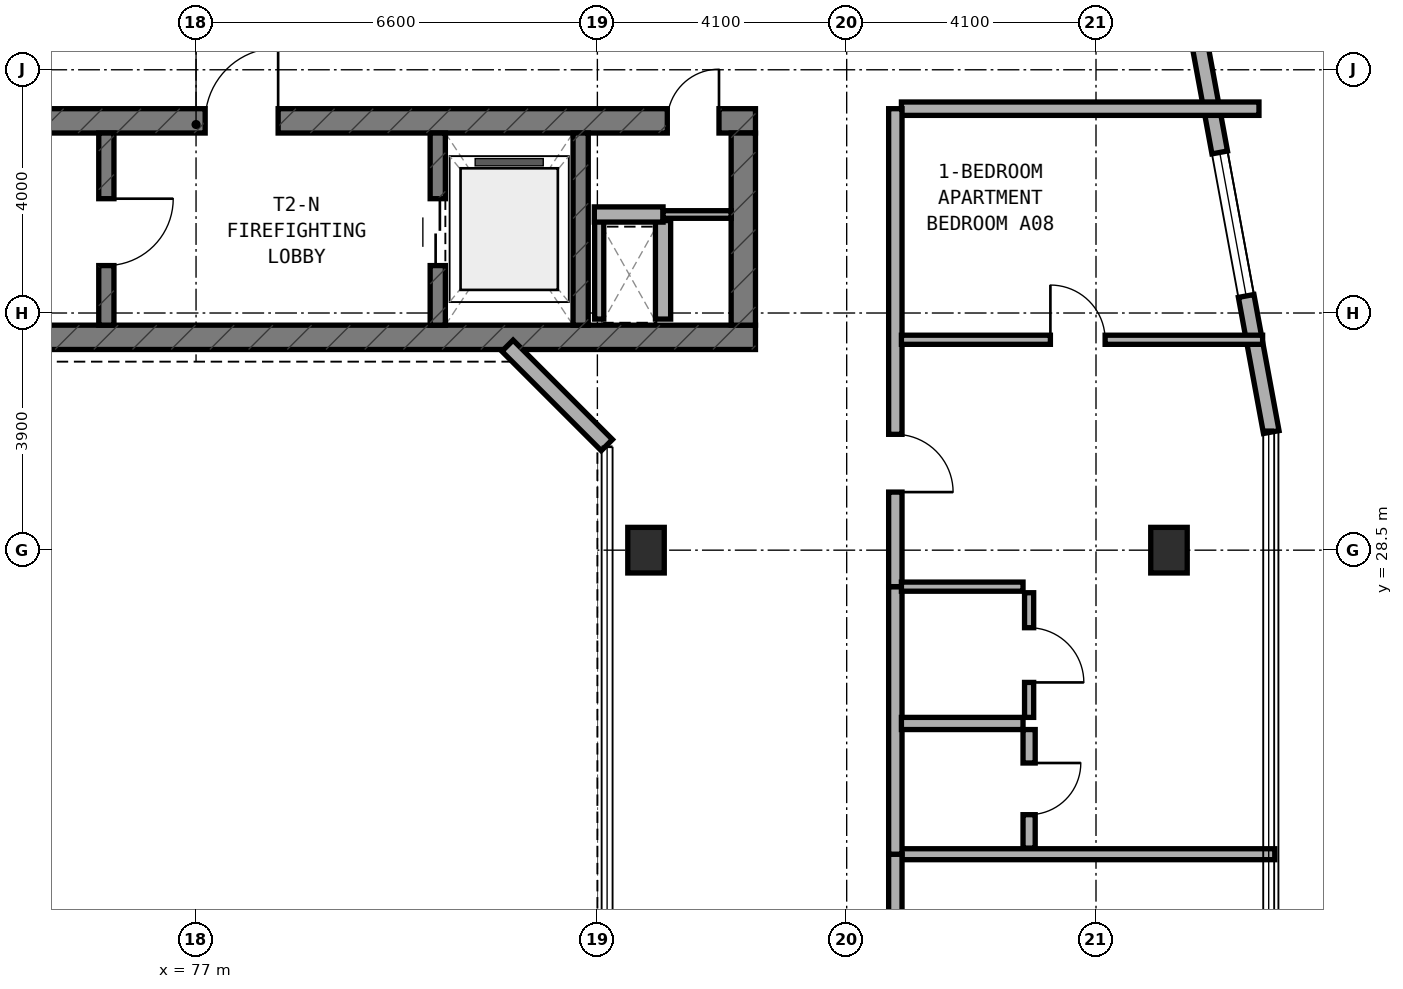
"""IFC4 building model, lengths in metres.
Left out: names, types, materials, properties, quantities, classifications, styles, units other than length and angle.
Written with IfcOpenShell. Run it as: python <this file> out.ifc"""

import sys

from ifc_helpers import new_model, si_unit, direction, frame, frame_2d, origin, origin_2d, place, context, subcontext, project, spatial, rectangle, extrude, element, fill, save


model = new_model("IFC4")
c1 = context("Model", 3, precision=1e-05, world=origin(), true_north=direction((0.0, 1.0)))
c2 = subcontext(c1, "Body", "Model", "MODEL_VIEW")
j1 = project(units=[si_unit("LENGTHUNIT", "METRE"), si_unit("PLANEANGLEUNIT", "RADIAN")], contexts=[c1])
p1 = place(None, origin())
s1 = spatial("IfcSite", under=j1, at=p1, CompositionType="ELEMENT")
p2 = place(p1, origin())
s2 = spatial("IfcBuilding", under=s1, at=p2, CompositionType="ELEMENT")
p3 = place(p2, frame((0.0, 0.0, 95.0)))
s3 = spatial("IfcBuildingStorey", under=s2, at=p3, CompositionType="ELEMENT", Elevation=95.0)
p4 = place(p3, frame((68.0, 32.0, 0.0), z_axis=(0.0, 0.0, 1.0), x_axis=(1.0, 0.0, 0.0)))
e1 = element("IfcWall", 1, at=p4, inside=s3, PredefinedType="SHEAR", context=c2, shape_type="SweptSolid", body=[
    extrude(rectangle(XDim=18.2, YDim=0.4, at=frame_2d((9.1, 0.0))), origin(), (0.0, 0.0, 1.0), 3.5),
])
p5 = place(p3, frame((68.0, 35.56, 0.0), z_axis=(0.0, 0.0, 1.0), x_axis=(1.0, 0.0, 0.0)))
e2 = element("IfcWall", 2, at=p5, inside=s3, PredefinedType="SHEAR", context=c2, shape_type="SweptSolid", body=[
    extrude(rectangle(XDim=18.2, YDim=0.4, at=frame_2d((9.1, 0.0))), origin(), (0.0, 0.0, 1.0), 3.5),
])
p6 = place(p5, frame((9.15, 0.0, 0.0)))
e3 = element("IfcOpeningElement", 3, at=p6, cuts=e2, PredefinedType="OPENING", context=c2, shape_type="SweptSolid", body=[
    extrude(rectangle(XDim=1.2, YDim=2.15, at=frame_2d((0.6, 1.075))), frame((0.0, 0.21, 0.0), z_axis=(0.0, -1.0, 0.0), x_axis=(1.0, 0.0, 0.0)), (0.0, 0.0, 1.0), 0.42),
])
p7 = place(p5, frame((16.75, 0.0, 0.0)))
e4 = element("IfcOpeningElement", 4, at=p7, cuts=e2, PredefinedType="OPENING", context=c2, shape_type="SweptSolid", body=[
    extrude(rectangle(XDim=0.85, YDim=2.1, at=frame_2d((0.425, 1.05))), frame((0.0, 0.21, 0.0), z_axis=(0.0, -1.0, 0.0), x_axis=(1.0, 0.0, 0.0)), (0.0, 0.0, 1.0), 0.42),
])
p8 = place(p3, frame((86.0, 32.2, 0.0), z_axis=(0.0, 0.0, 1.0), x_axis=(0.0, 1.0, 0.0)))
e5 = element("IfcWall", 5, at=p8, inside=s3, PredefinedType="SHEAR", context=c2, shape_type="SweptSolid", body=[
    extrude(rectangle(XDim=3.16, YDim=0.4, at=frame_2d((1.58, 0.0))), origin(), (0.0, 0.0, 1.0), 3.5),
])
p9 = place(p3, frame((75.525, 32.2, 0.0), z_axis=(0.0, 0.0, 1.0), x_axis=(0.0, 1.0, 0.0)))
e6 = element("IfcWall", 6, at=p9, inside=s3, PredefinedType="STANDARD", context=c2, shape_type="SweptSolid", body=[
    extrude(rectangle(XDim=3.16, YDim=0.25, at=frame_2d((1.58, 0.0))), origin(), (0.0, 0.0, 1.0), 3.25),
])
p10 = place(p9, frame((0.98, 0.0, 0.0)))
e7 = element("IfcOpeningElement", 7, at=p10, cuts=e6, PredefinedType="OPENING", context=c2, shape_type="SweptSolid", body=[
    extrude(rectangle(XDim=1.1, YDim=2.15, at=frame_2d((0.55, 1.075))), frame((0.0, 0.135, 0.0), z_axis=(0.0, -1.0, 0.0), x_axis=(1.0, 0.0, 0.0)), (0.0, 0.0, 1.0), 0.27),
])
p11 = place(p3, frame((80.975, 32.2, 0.0), z_axis=(0.0, 0.0, 1.0), x_axis=(0.0, 1.0, 0.0)))
e8 = element("IfcWall", 8, at=p11, inside=s3, PredefinedType="STANDARD", context=c2, shape_type="SweptSolid", body=[
    extrude(rectangle(XDim=3.16, YDim=0.25, at=frame_2d((1.58, 0.0))), origin(), (0.0, 0.0, 1.0), 3.25),
])
p12 = place(p11, frame((0.98, 0.0, 0.0)))
e9 = element("IfcOpeningElement", 9, at=p12, cuts=e8, PredefinedType="OPENING", context=c2, shape_type="SweptSolid", body=[
    extrude(rectangle(XDim=1.1, YDim=2.15, at=frame_2d((0.55, 1.075))), frame((0.0, 0.135, 0.0), z_axis=(0.0, -1.0, 0.0), x_axis=(1.0, 0.0, 0.0)), (0.0, 0.0, 1.0), 0.27),
])
p13 = place(p3, frame((83.325, 32.2, 0.0), z_axis=(0.0, 0.0, 1.0), x_axis=(0.0, 1.0, 0.0)))
e10 = element("IfcWall", 10, at=p13, inside=s3, PredefinedType="STANDARD", context=c2, shape_type="SweptSolid", body=[
    extrude(rectangle(XDim=3.16, YDim=0.25, at=frame_2d((1.58, 0.0))), origin(), (0.0, 0.0, 1.0), 3.25),
])
for number, where, z_axis, x_axis in (
    (11, (93.0, 28.5, 0.0), (0.0, 0.0, 1.0), (1.0, 0.0, 0.0)),
    (12, (84.4, 28.5, 0.0), (0.0, 0.0, 1.0), (1.0, 0.0, 0.0)),
):
    element("IfcColumn", number, at=place(p3, frame(where, z_axis=z_axis, x_axis=x_axis)), inside=s3, PredefinedType="COLUMN", context=c2, shape_type="SweptSolid", body=[
        extrude(rectangle(XDim=0.6, YDim=0.75, at=origin_2d()), origin(), (0.0, 0.0, 1.0), 3.5),
    ])
p14 = place(p3, frame((94.682, 30.442, 0.0), z_axis=(0.0, 0.0, 1.0), x_axis=(-0.181209963057, 0.983444431215, 0.0)))
e13 = element("IfcWall", 13, at=p14, inside=s3, PredefinedType="STANDARD", context=c2, shape_type="SweptSolid", body=[
    extrude(rectangle(XDim=8.889, YDim=0.26, at=frame_2d((4.445, 0.0))), origin(), (0.0, 0.0, 1.0), 3.25),
])
p15 = place(p14, frame((2.276, 0.0, 0.8)))
e14 = element("IfcOpeningElement", 14, at=p15, cuts=e13, PredefinedType="OPENING", context=c2, shape_type="SweptSolid", body=[
    extrude(rectangle(XDim=2.4, YDim=1.6, at=frame_2d((1.2, 0.8))), frame((0.0, 0.14, 0.0), z_axis=(0.0, -1.0, 0.0), x_axis=(1.0, 0.0, 0.0)), (0.0, 0.0, 1.0), 0.28),
])
p16 = place(p3, frame((83.756, 30.228, 0.0), z_axis=(0.0, 0.0, 1.0), x_axis=(-0.707106781187, 0.707106781187, 0.0)))
e15 = element("IfcWall", 15, at=p16, inside=s3, PredefinedType="STANDARD", context=c2, shape_type="SweptSolid", body=[
    extrude(rectangle(XDim=2.311, YDim=0.26, at=frame_2d((1.155, 0.0))), origin(), (0.0, 0.0, 1.0), 3.25),
])
p17 = place(p3, frame((83.63, 32.3, 0.0), z_axis=(0.0, 0.0, 1.0), x_axis=(0.0, 1.0, 0.0)))
e16 = element("IfcWall", 16, at=p17, inside=s3, PredefinedType="PARTITIONING", context=c2, shape_type="SweptSolid", body=[
    extrude(rectangle(XDim=1.62, YDim=0.15, at=frame_2d((0.81, 0.0))), origin(), (0.0, 0.0, 1.0), 2.825),
])
p18 = place(p3, frame((84.68, 32.3, 0.0), z_axis=(0.0, 0.0, 1.0), x_axis=(0.0, 1.0, 0.0)))
e17 = element("IfcWall", 17, at=p18, inside=s3, PredefinedType="SOLIDWALL", context=c2, shape_type="SweptSolid", body=[
    extrude(rectangle(XDim=1.62, YDim=0.25, at=frame_2d((0.81, 0.0))), origin(), (0.0, 0.0, 1.0), 3.22),
])
p19 = place(p3, frame((83.55, 34.02, 0.0), z_axis=(0.0, 0.0, 1.0), x_axis=(1.0, 0.0, 0.0)))
e18 = element("IfcWall", 18, at=p19, inside=s3, PredefinedType="SOLIDWALL", context=c2, shape_type="SweptSolid", body=[
    extrude(rectangle(XDim=1.13, YDim=0.25, at=frame_2d((0.565, 0.0))), origin(), (0.0, 0.0, 1.0), 3.22),
])
p20 = place(p3, frame((84.68, 34.02, 0.0), z_axis=(0.0, 0.0, 1.0), x_axis=(1.0, 0.0, 0.0)))
e19 = element("IfcWall", 19, at=p20, inside=s3, PredefinedType="PARTITIONING", context=c2, shape_type="SweptSolid", body=[
    extrude(rectangle(XDim=1.12, YDim=0.125, at=frame_2d((0.56, 0.0))), origin(), (0.0, 0.0, 1.0), 3.22),
])
p21 = place(p3, frame((88.6, 35.76, 0.0), z_axis=(0.0, 0.0, 1.0), x_axis=(1.0, 0.0, 0.0)))
e20 = element("IfcWall", 20, at=p21, inside=s3, PredefinedType="SOLIDWALL", context=c2, shape_type="SweptSolid", body=[
    extrude(rectangle(XDim=5.88, YDim=0.22, at=frame_2d((2.94, 0.0))), origin(), (0.0, 0.0, 1.0), 2.945),
])
p22 = place(p3, frame((88.5, 23.5, 0.0), z_axis=(0.0, 0.0, 1.0), x_axis=(1.0, 0.0, 0.0)))
e21 = element("IfcWall", 21, at=p22, inside=s3, PredefinedType="SOLIDWALL", context=c2, shape_type="SweptSolid", body=[
    extrude(rectangle(XDim=6.24, YDim=0.18, at=frame_2d((3.12, 0.0))), origin(), (0.0, 0.0, 1.0), 2.945),
])
p23 = place(p3, frame((88.5, 18.64, 0.0), z_axis=(0.0, 0.0, 1.0), x_axis=(0.0, 1.0, 0.0)))
e22 = element("IfcWall", 22, at=p23, inside=s3, PredefinedType="SOLIDWALL", context=c2, shape_type="SweptSolid", body=[
    extrude(rectangle(XDim=4.86, YDim=0.22, at=frame_2d((2.43, 0.0))), origin(), (0.0, 0.0, 1.0), 2.825),
])
p24 = place(p23, frame((1.955, 0.0, 0.0)))
e23 = element("IfcOpeningElement", 23, at=p24, cuts=e22, PredefinedType="OPENING", context=c2, shape_type="SweptSolid", body=[
    extrude(rectangle(XDim=0.95, YDim=2.1, at=frame_2d((0.475, 1.05))), frame((0.0, 0.12, 0.0), z_axis=(0.0, -1.0, 0.0), x_axis=(1.0, 0.0, 0.0)), (0.0, 0.0, 1.0), 0.24),
])
p25 = place(p3, frame((88.5, 23.5, 0.0), z_axis=(0.0, 0.0, 1.0), x_axis=(0.0, 1.0, 0.0)))
e24 = element("IfcWall", 24, at=p25, inside=s3, PredefinedType="SOLIDWALL", context=c2, shape_type="SweptSolid", body=[
    extrude(rectangle(XDim=4.4, YDim=0.22, at=frame_2d((2.2, 0.0))), origin(), (0.0, 0.0, 1.0), 3.22),
])
p26 = place(p3, frame((88.5, 27.9, 0.0), z_axis=(0.0, 0.0, 1.0), x_axis=(0.0, 1.0, 0.0)))
e25 = element("IfcWall", 25, at=p26, inside=s3, PredefinedType="SOLIDWALL", context=c2, shape_type="SweptSolid", body=[
    extrude(rectangle(XDim=7.86, YDim=0.22, at=frame_2d((3.93, 0.0))), origin(), (0.0, 0.0, 1.0), 2.825),
])
p27 = place(p26, frame((1.555, 0.0, 0.0)))
e26 = element("IfcOpeningElement", 26, at=p27, cuts=e25, PredefinedType="OPENING", context=c2, shape_type="SweptSolid", body=[
    extrude(rectangle(XDim=0.95, YDim=2.1, at=frame_2d((0.475, 1.05))), frame((0.0, 0.12, 0.0), z_axis=(0.0, -1.0, 0.0), x_axis=(1.0, 0.0, 0.0)), (0.0, 0.0, 1.0), 0.24),
])
p28 = place(p3, frame((88.6, 31.96, 0.0), z_axis=(0.0, 0.0, 1.0), x_axis=(1.0, 0.0, 0.0)))
e27 = element("IfcWall", 27, at=p28, inside=s3, PredefinedType="PARTITIONING", context=c2, shape_type="SweptSolid", body=[
    extrude(rectangle(XDim=5.94, YDim=0.15, at=frame_2d((2.97, 0.0))), origin(), (0.0, 0.0, 1.0), 2.945),
])
p29 = place(p28, frame((2.45, 0.0, 0.0)))
e28 = element("IfcOpeningElement", 28, at=p29, cuts=e27, PredefinedType="OPENING", context=c2, shape_type="SweptSolid", body=[
    extrude(rectangle(XDim=0.9, YDim=2.1, at=frame_2d((0.45, 1.05))), frame((0.0, 0.085, 0.0), z_axis=(0.0, -1.0, 0.0), x_axis=(1.0, 0.0, 0.0)), (0.0, 0.0, 1.0), 0.17),
])
p30 = place(p3, frame((88.6, 25.65, 0.0), z_axis=(0.0, 0.0, 1.0), x_axis=(1.0, 0.0, 0.0)))
e29 = element("IfcWall", 29, at=p30, inside=s3, PredefinedType="PLUMBINGWALL", context=c2, shape_type="SweptSolid", body=[
    extrude(rectangle(XDim=2.0, YDim=0.2, at=frame_2d((1.0, 0.0))), origin(), (0.0, 0.0, 1.0), 3.22),
])
p31 = place(p3, frame((88.6, 27.9, 0.0), z_axis=(0.0, 0.0, 1.0), x_axis=(1.0, 0.0, 0.0)))
e30 = element("IfcWall", 30, at=p31, inside=s3, PredefinedType="PARTITIONING", context=c2, shape_type="SweptSolid", body=[
    extrude(rectangle(XDim=2.0, YDim=0.15, at=frame_2d((1.0, 0.0))), origin(), (0.0, 0.0, 1.0), 3.22),
])
p32 = place(p3, frame((90.7, 23.6, 0.0), z_axis=(0.0, 0.0, 1.0), x_axis=(0.0, 1.0, 0.0)))
e31 = element("IfcWall", 31, at=p32, inside=s3, PredefinedType="PLUMBINGWALL", context=c2, shape_type="SweptSolid", body=[
    extrude(rectangle(XDim=1.95, YDim=0.2, at=frame_2d((0.975, 0.0))), origin(), (0.0, 0.0, 1.0), 3.22),
])
p33 = place(p32, frame((0.55, 0.0, 0.0)))
e32 = element("IfcOpeningElement", 32, at=p33, cuts=e31, PredefinedType="OPENING", context=c2, shape_type="SweptSolid", body=[
    extrude(rectangle(XDim=0.85, YDim=2.1, at=frame_2d((0.425, 1.05))), frame((0.0, 0.11, 0.0), z_axis=(0.0, -1.0, 0.0), x_axis=(1.0, 0.0, 0.0)), (0.0, 0.0, 1.0), 0.22),
])
p34 = place(p3, frame((90.7, 25.75, 0.0), z_axis=(0.0, 0.0, 1.0), x_axis=(0.0, 1.0, 0.0)))
e33 = element("IfcWall", 33, at=p34, inside=s3, PredefinedType="PARTITIONING", context=c2, shape_type="SweptSolid", body=[
    extrude(rectangle(XDim=2.05, YDim=0.15, at=frame_2d((1.025, 0.0))), origin(), (0.0, 0.0, 1.0), 3.22),
])
p35 = place(p34, frame((0.575, 0.0, 0.0)))
e34 = element("IfcOpeningElement", 34, at=p35, cuts=e33, PredefinedType="OPENING", context=c2, shape_type="SweptSolid", body=[
    extrude(rectangle(XDim=0.9, YDim=2.1, at=frame_2d((0.45, 1.05))), frame((0.0, 0.085, 0.0), z_axis=(0.0, -1.0, 0.0), x_axis=(1.0, 0.0, 0.0)), (0.0, 0.0, 1.0), 0.17),
])
p36 = place(p15, origin())
e35 = element("IfcWindow", 35, at=p36, inside=s3, PartitioningType="SINGLE_PANEL", PredefinedType="WINDOW", context=c2, shape_type="SweptSolid", body=[
    extrude(rectangle(XDim=2.4, YDim=1.6, at=frame_2d((1.2, 0.8))), frame((0.0, 0.03, 0.0), z_axis=(0.0, -1.0, 0.0), x_axis=(1.0, 0.0, 0.0)), (0.0, 0.0, 1.0), 0.06),
])
fill(e14, e35)
p37 = place(p10, frame((1.1, 0.0, 0.0), z_axis=(0.0, 0.0, 1.0), x_axis=(-1.0, 0.0, 0.0)))
e36 = element("IfcDoor", 36, at=p37, inside=s3, OperationType="SINGLE_SWING_LEFT", PredefinedType="DOOR", context=c2, shape_type="SweptSolid", body=[
    extrude(rectangle(XDim=1.1, YDim=2.15, at=frame_2d((0.55, 1.075))), frame((0.0, 0.025, 0.0), z_axis=(0.0, -1.0, 0.0), x_axis=(1.0, 0.0, 0.0)), (0.0, 0.0, 1.0), 0.05),
])
fill(e7, e36)
p38 = place(p6, origin())
e37 = element("IfcDoor", 37, at=p38, inside=s3, OperationType="SINGLE_SWING_RIGHT", PredefinedType="DOOR", context=c2, shape_type="SweptSolid", body=[
    extrude(rectangle(XDim=1.2, YDim=2.15, at=frame_2d((0.6, 1.075))), frame((0.0, 0.025, 0.0), z_axis=(0.0, -1.0, 0.0), x_axis=(1.0, 0.0, 0.0)), (0.0, 0.0, 1.0), 0.05),
])
fill(e3, e37)
p39 = place(p12, origin())
e38 = element("IfcDoor", 38, at=p39, inside=s3, OperationType="DOUBLE_DOOR_SLIDING", PredefinedType="DOOR", context=c2, shape_type="SweptSolid", body=[
    extrude(rectangle(XDim=1.1, YDim=2.15, at=frame_2d((0.55, 1.075))), frame((0.0, 0.025, 0.0), z_axis=(0.0, -1.0, 0.0), x_axis=(1.0, 0.0, 0.0)), (0.0, 0.0, 1.0), 0.05),
])
fill(e9, e38)
p40 = place(p7, origin())
e39 = element("IfcDoor", 39, at=p40, inside=s3, OperationType="SINGLE_SWING_RIGHT", PredefinedType="DOOR", context=c2, shape_type="SweptSolid", body=[
    extrude(rectangle(XDim=0.85, YDim=2.1, at=frame_2d((0.425, 1.05))), frame((0.0, 0.025, 0.0), z_axis=(0.0, -1.0, 0.0), x_axis=(1.0, 0.0, 0.0)), (0.0, 0.0, 1.0), 0.05),
])
fill(e4, e39)
p41 = place(p27, frame((0.95, 0.0, 0.0), z_axis=(0.0, 0.0, 1.0), x_axis=(-1.0, 0.0, 0.0)))
e40 = element("IfcDoor", 40, at=p41, inside=s3, OperationType="SINGLE_SWING_RIGHT", PredefinedType="DOOR", context=c2, shape_type="SweptSolid", body=[
    extrude(rectangle(XDim=0.95, YDim=2.1, at=frame_2d((0.475, 1.05))), frame((0.0, 0.025, 0.0), z_axis=(0.0, -1.0, 0.0), x_axis=(1.0, 0.0, 0.0)), (0.0, 0.0, 1.0), 0.05),
])
fill(e26, e40)
p42 = place(p29, origin())
e41 = element("IfcDoor", 41, at=p42, inside=s3, OperationType="SINGLE_SWING_LEFT", PredefinedType="DOOR", context=c2, shape_type="SweptSolid", body=[
    extrude(rectangle(XDim=0.9, YDim=2.1, at=frame_2d((0.45, 1.05))), frame((0.0, 0.025, 0.0), z_axis=(0.0, -1.0, 0.0), x_axis=(1.0, 0.0, 0.0)), (0.0, 0.0, 1.0), 0.05),
])
fill(e28, e41)
p43 = place(p33, frame((0.85, 0.0, 0.0), z_axis=(0.0, 0.0, 1.0), x_axis=(-1.0, 0.0, 0.0)))
e42 = element("IfcDoor", 42, at=p43, inside=s3, OperationType="SINGLE_SWING_LEFT", PredefinedType="DOOR", context=c2, shape_type="SweptSolid", body=[
    extrude(rectangle(XDim=0.85, YDim=2.1, at=frame_2d((0.425, 1.05))), frame((0.0, 0.025, 0.0), z_axis=(0.0, -1.0, 0.0), x_axis=(1.0, 0.0, 0.0)), (0.0, 0.0, 1.0), 0.05),
])
fill(e32, e42)
p44 = place(p35, frame((0.9, 0.0, 0.0), z_axis=(0.0, 0.0, 1.0), x_axis=(-1.0, 0.0, 0.0)))
e43 = element("IfcDoor", 43, at=p44, inside=s3, OperationType="SINGLE_SWING_RIGHT", PredefinedType="DOOR", context=c2, shape_type="SweptSolid", body=[
    extrude(rectangle(XDim=0.9, YDim=2.1, at=frame_2d((0.45, 1.05))), frame((0.0, 0.025, 0.0), z_axis=(0.0, -1.0, 0.0), x_axis=(1.0, 0.0, 0.0)), (0.0, 0.0, 1.0), 0.05),
])
fill(e34, e43)
save(model, sys.argv[1])
